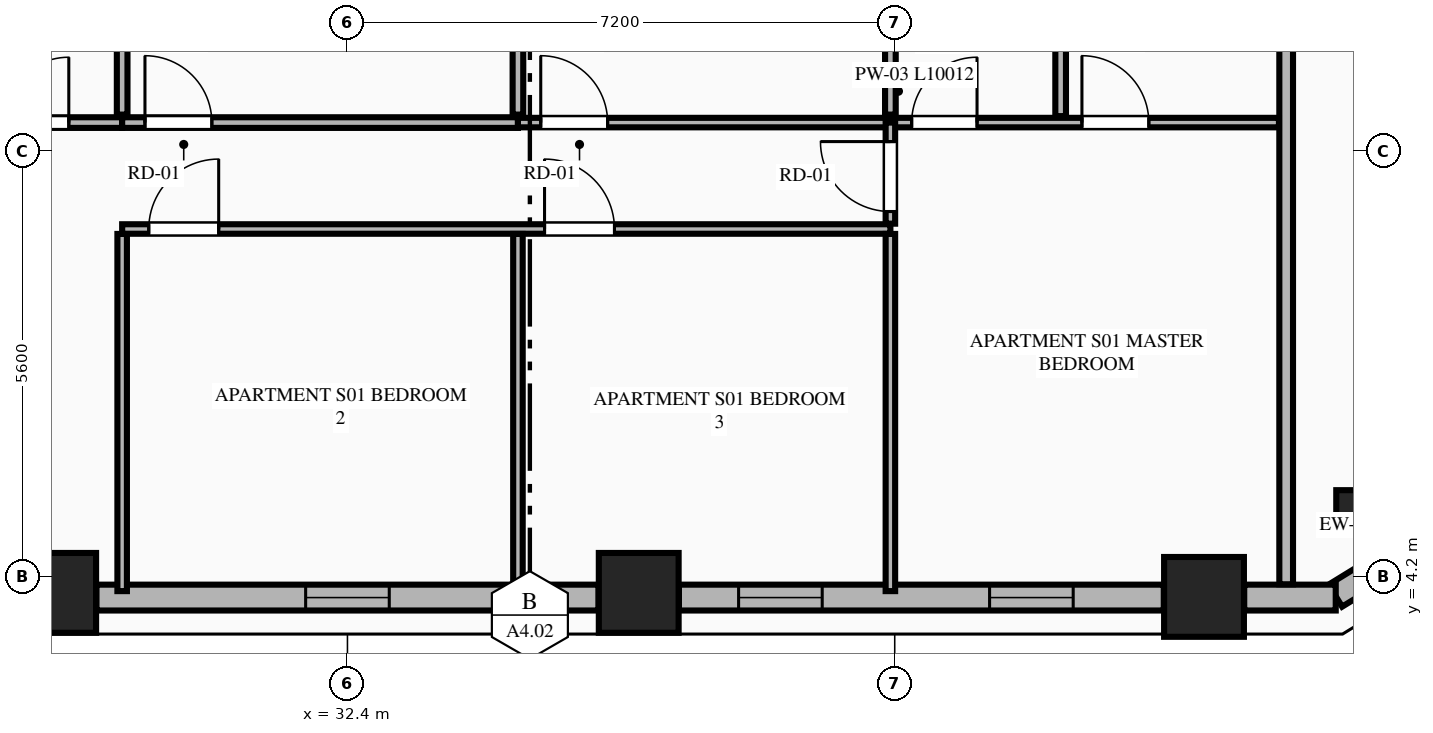
"""IFC4 building model, lengths in metres.
Left out: names, types, materials, properties, quantities, classifications, styles, units other than length and angle.
Written with IfcOpenShell. Run it as: python <this file> out.ifc"""

import sys

from ifc_helpers import new_model, si_unit, direction, frame, frame_2d, origin, origin_2d, place, context, subcontext, project, spatial, rectangle, extrude, element, fill, save


model = new_model("IFC4")
c1 = context("Model", 3, precision=1e-05, world=origin(), true_north=direction((0.0, 1.0)))
c2 = subcontext(c1, "Body", "Model", "MODEL_VIEW")
j1 = project(units=[si_unit("LENGTHUNIT", "METRE"), si_unit("PLANEANGLEUNIT", "RADIAN")], contexts=[c1])
p1 = place(None, origin())
s1 = spatial("IfcSite", under=j1, at=p1, CompositionType="ELEMENT")
p2 = place(p1, origin())
s2 = spatial("IfcBuilding", under=s1, at=p2, CompositionType="ELEMENT")
p3 = place(p2, frame((0.0, 0.0, 123.25)))
s3 = spatial("IfcBuildingStorey", under=s2, at=p3, CompositionType="ELEMENT", Elevation=123.25)
for number, where, z_axis, x_axis in (
    (1, (28.568, 3.992, 0.0), (0.0, 0.0, 1.0), (1.0, 0.0, 0.0)),
    (2, (36.232, 3.992, 0.0), (0.0, 0.0, 1.0), (1.0, 0.0, 0.0)),
    (3, (43.669, 3.939, 0.0), (0.0, 0.0, 1.0), (1.0, 0.0, 0.0)),
):
    element("IfcColumn", number, at=place(p3, frame(where, z_axis=z_axis, x_axis=x_axis)), inside=s3, PredefinedType="COLUMN", context=c2, shape_type="SweptSolid", body=[
        extrude(rectangle(XDim=1.05, YDim=1.05, at=origin_2d()), origin(), (0.0, 0.0, 1.0), 3.55),
    ])
p4 = place(p3, frame((45.659, 5.093, 0.0), z_axis=(0.0, 0.0, 1.0), x_axis=(0.865160173452, 0.501495637342, 0.0)))
e4 = element("IfcColumn", 4, at=p4, inside=s3, PredefinedType="PILASTER", context=c2, shape_type="SweptSolid", body=[
    extrude(rectangle(XDim=0.5, YDim=0.35, at=origin_2d()), origin(), (0.0, 0.0, 1.0), 3.55),
])
p5 = place(p3, frame((45.397, 3.955, 0.0), z_axis=(0.0, 0.0, 1.0), x_axis=(0.851798915137, 0.523868884523, 0.0)))
e5 = element("IfcWall", 5, at=p5, inside=s3, PredefinedType="STANDARD", context=c2, shape_type="SweptSolid", body=[
    extrude(rectangle(XDim=1.848, YDim=0.34, at=frame_2d((0.924, 0.0))), origin(), (0.0, 0.0, 1.0), 3.34),
])
p6 = place(p3, frame((29.097, 3.93, 0.0), z_axis=(0.0, 0.0, 1.0), x_axis=(1.0, 0.0, 0.0)))
e6 = element("IfcWall", 6, at=p6, inside=s3, PredefinedType="STANDARD", context=c2, shape_type="SweptSolid", body=[
    extrude(rectangle(XDim=6.606, YDim=0.34, at=frame_2d((3.303, 0.0))), origin(), (0.0, 0.0, 1.0), 2.797),
])
p7 = place(p6, frame((2.753, 0.0, 0.75)))
e7 = element("IfcOpeningElement", 7, at=p7, cuts=e6, PredefinedType="OPENING", context=c2, shape_type="SweptSolid", body=[
    extrude(rectangle(XDim=1.1, YDim=1.897, at=frame_2d((0.55, 0.948))), frame((0.0, 0.18, 0.0), z_axis=(0.0, -1.0, 0.0), x_axis=(1.0, 0.0, 0.0)), (0.0, 0.0, 1.0), 0.36),
])
p8 = place(p3, frame((36.761, 3.93, 0.0), z_axis=(0.0, 0.0, 1.0), x_axis=(1.0, 0.0, 0.0)))
e8 = element("IfcWall", 8, at=p8, inside=s3, PredefinedType="STANDARD", context=c2, shape_type="SweptSolid", body=[
    extrude(rectangle(XDim=6.379, YDim=0.34, at=frame_2d((3.189, 0.0))), origin(), (0.0, 0.0, 1.0), 2.797),
])
p9 = place(p8, frame((0.785, 0.0, 0.75)))
e9 = element("IfcOpeningElement", 9, at=p9, cuts=e8, PredefinedType="OPENING", context=c2, shape_type="SweptSolid", body=[
    extrude(rectangle(XDim=1.1, YDim=1.897, at=frame_2d((0.55, 0.948))), frame((0.0, 0.18, 0.0), z_axis=(0.0, -1.0, 0.0), x_axis=(1.0, 0.0, 0.0)), (0.0, 0.0, 1.0), 0.36),
])
p10 = place(p8, frame((4.087, 0.0, 0.75)))
e10 = element("IfcOpeningElement", 10, at=p10, cuts=e8, PredefinedType="OPENING", context=c2, shape_type="SweptSolid", body=[
    extrude(rectangle(XDim=1.1, YDim=1.897, at=frame_2d((0.55, 0.948))), frame((0.0, 0.18, 0.0), z_axis=(0.0, -1.0, 0.0), x_axis=(1.0, 0.0, 0.0)), (0.0, 0.0, 1.0), 0.36),
])
p11 = place(p3, frame((44.198, 3.93, 0.0), z_axis=(0.0, 0.0, 1.0), x_axis=(1.0, 0.0, 0.0)))
e11 = element("IfcWall", 11, at=p11, inside=s3, PredefinedType="STANDARD", context=c2, shape_type="SweptSolid", body=[
    extrude(rectangle(XDim=1.204, YDim=0.34, at=frame_2d((0.602, 0.0))), origin(), (0.0, 0.0, 1.0), 3.34),
])
p12 = place(p3, frame((44.75, 4.105, 0.0), z_axis=(0.0, 0.0, 1.0), x_axis=(0.0, 1.0, 0.0)))
e12 = element("IfcWall", 12, at=p12, inside=s3, PredefinedType="PARTITIONING", context=c2, shape_type="SweptSolid", body=[
    extrude(rectangle(XDim=12.395, YDim=0.18, at=frame_2d((6.198, 0.0))), origin(), (0.0, 0.0, 1.0), 3.34),
])
p13 = place(p3, frame((22.1, 10.179, 0.0), z_axis=(0.0, 0.0, 1.0), x_axis=(1.0, 0.0, 0.0)))
e13 = element("IfcWall", 13, at=p13, inside=s3, PredefinedType="PLUMBINGWALL", context=c2, shape_type="SweptSolid", body=[
    extrude(rectangle(XDim=7.336, YDim=0.14, at=frame_2d((3.668, 0.0))), origin(), (0.0, 0.0, 1.0), 3.34),
])
p14 = place(p13, frame((5.774, 0.0, 0.0)))
e14 = element("IfcOpeningElement", 14, at=p14, cuts=e13, PredefinedType="OPENING", context=c2, shape_type="SweptSolid", body=[
    extrude(rectangle(XDim=0.86, YDim=2.1, at=frame_2d((0.43, 1.05))), frame((0.0, 0.08, 0.0), z_axis=(0.0, -1.0, 0.0), x_axis=(1.0, 0.0, 0.0)), (0.0, 0.0, 1.0), 0.16),
])
p15 = place(p13, frame((0.26, 0.0, 0.0)))
e15 = element("IfcOpeningElement", 15, at=p15, cuts=e13, PredefinedType="OPENING", context=c2, shape_type="SweptSolid", body=[
    extrude(rectangle(XDim=0.88, YDim=2.15, at=frame_2d((0.44, 1.075))), frame((0.0, 0.08, 0.0), z_axis=(0.0, -1.0, 0.0), x_axis=(1.0, 0.0, 0.0)), (0.0, 0.0, 1.0), 0.16),
])
p16 = place(p13, frame((3.485, 0.0, 0.0)))
e16 = element("IfcOpeningElement", 16, at=p16, cuts=e13, PredefinedType="OPENING", context=c2, shape_type="SweptSolid", body=[
    extrude(rectangle(XDim=0.88, YDim=2.15, at=frame_2d((0.44, 1.075))), frame((0.0, 0.08, 0.0), z_axis=(0.0, -1.0, 0.0), x_axis=(1.0, 0.0, 0.0)), (0.0, 0.0, 1.0), 0.16),
])
p17 = place(p3, frame((29.436, 10.179, 0.0), z_axis=(0.0, 0.0, 1.0), x_axis=(1.0, 0.0, 0.0)))
e17 = element("IfcWall", 17, at=p17, inside=s3, PredefinedType="PLUMBINGWALL", context=c2, shape_type="SweptSolid", body=[
    extrude(rectangle(XDim=5.207, YDim=0.14, at=frame_2d((2.604, 0.0))), origin(), (0.0, 0.0, 1.0), 3.34),
])
p18 = place(p17, frame((0.3, 0.0, 0.0)))
e18 = element("IfcOpeningElement", 18, at=p18, cuts=e17, PredefinedType="OPENING", context=c2, shape_type="SweptSolid", body=[
    extrude(rectangle(XDim=0.88, YDim=2.15, at=frame_2d((0.44, 1.075))), frame((0.0, 0.08, 0.0), z_axis=(0.0, -1.0, 0.0), x_axis=(1.0, 0.0, 0.0)), (0.0, 0.0, 1.0), 0.16),
])
p19 = place(p3, frame((34.643, 10.179, 0.0), z_axis=(0.0, 0.0, 1.0), x_axis=(1.0, 0.0, 0.0)))
e19 = element("IfcWall", 19, at=p19, inside=s3, PredefinedType="PARTITIONING", context=c2, shape_type="SweptSolid", body=[
    extrude(rectangle(XDim=10.012, YDim=0.125, at=frame_2d((5.006, 0.0))), origin(), (0.0, 0.0, 1.0), 3.34),
])
p20 = place(p19, frame((5.18, 0.0, 0.0)))
e20 = element("IfcOpeningElement", 20, at=p20, cuts=e19, PredefinedType="OPENING", context=c2, shape_type="SweptSolid", body=[
    extrude(rectangle(XDim=0.86, YDim=2.1, at=frame_2d((0.43, 1.05))), frame((0.0, 0.073, 0.0), z_axis=(0.0, -1.0, 0.0), x_axis=(1.0, 0.0, 0.0)), (0.0, 0.0, 1.0), 0.145),
])
p21 = place(p19, frame((7.42, 0.0, 0.0)))
e21 = element("IfcOpeningElement", 21, at=p21, cuts=e19, PredefinedType="OPENING", context=c2, shape_type="SweptSolid", body=[
    extrude(rectangle(XDim=0.88, YDim=2.15, at=frame_2d((0.44, 1.075))), frame((0.0, 0.073, 0.0), z_axis=(0.0, -1.0, 0.0), x_axis=(1.0, 0.0, 0.0)), (0.0, 0.0, 1.0), 0.145),
])
p22 = place(p19, frame((0.3, 0.0, 0.0)))
e22 = element("IfcOpeningElement", 22, at=p22, cuts=e19, PredefinedType="OPENING", context=c2, shape_type="SweptSolid", body=[
    extrude(rectangle(XDim=0.88, YDim=2.15, at=frame_2d((0.44, 1.075))), frame((0.0, 0.073, 0.0), z_axis=(0.0, -1.0, 0.0), x_axis=(1.0, 0.0, 0.0)), (0.0, 0.0, 1.0), 0.145),
])
p23 = place(p3, frame((29.436, 4.015, 0.0), z_axis=(0.0, 0.0, 1.0), x_axis=(0.0, 1.0, 0.0)))
e23 = element("IfcWall", 23, at=p23, inside=s3, PredefinedType="PARTITIONING", context=c2, shape_type="SweptSolid", body=[
    extrude(rectangle(XDim=4.699, YDim=0.125, at=frame_2d((2.35, 0.0))), origin(), (0.0, 0.0, 1.0), 3.34),
])
p24 = place(p3, frame((29.436, 8.779, 0.0), z_axis=(0.0, 0.0, 1.0), x_axis=(1.0, 0.0, 0.0)))
e24 = element("IfcWall", 24, at=p24, inside=s3, PredefinedType="PARTITIONING", context=c2, shape_type="SweptSolid", body=[
    extrude(rectangle(XDim=10.107, YDim=0.125, at=frame_2d((5.053, 0.0))), origin(), (0.0, 0.0, 1.0), 3.34),
])
p25 = place(p24, frame((0.35, 0.0, 0.0)))
e25 = element("IfcOpeningElement", 25, at=p25, cuts=e24, PredefinedType="OPENING", context=c2, shape_type="SweptSolid", body=[
    extrude(rectangle(XDim=0.92, YDim=2.15, at=frame_2d((0.46, 1.075))), frame((0.0, 0.073, 0.0), z_axis=(0.0, -1.0, 0.0), x_axis=(1.0, 0.0, 0.0)), (0.0, 0.0, 1.0), 0.145),
])
p26 = place(p24, frame((5.557, 0.0, 0.0)))
e26 = element("IfcOpeningElement", 26, at=p26, cuts=e24, PredefinedType="OPENING", context=c2, shape_type="SweptSolid", body=[
    extrude(rectangle(XDim=0.92, YDim=2.15, at=frame_2d((0.46, 1.075))), frame((0.0, 0.073, 0.0), z_axis=(0.0, -1.0, 0.0), x_axis=(1.0, 0.0, 0.0)), (0.0, 0.0, 1.0), 0.145),
])
p27 = place(p3, frame((39.543, 8.849, 0.0), z_axis=(0.0, 0.0, 1.0), x_axis=(0.0, 1.0, 0.0)))
e27 = element("IfcWall", 27, at=p27, inside=s3, PredefinedType="PARTITIONING", context=c2, shape_type="SweptSolid", body=[
    extrude(rectangle(XDim=1.33, YDim=0.125, at=frame_2d((0.665, 0.0))), origin(), (0.0, 0.0, 1.0), 3.34),
])
p28 = place(p27, frame((0.16, 0.0, 0.0)))
e28 = element("IfcOpeningElement", 28, at=p28, cuts=e27, PredefinedType="OPENING", context=c2, shape_type="SweptSolid", body=[
    extrude(rectangle(XDim=0.92, YDim=2.15, at=frame_2d((0.46, 1.075))), frame((0.0, 0.073, 0.0), z_axis=(0.0, -1.0, 0.0), x_axis=(1.0, 0.0, 0.0)), (0.0, 0.0, 1.0), 0.145),
])
for number, where, z_axis, x_axis in (
    (29, (29.436, 10.284, 0.0), (0.0, 0.0, 1.0), (0.0, 1.0, 0.0)),
    (30, (34.643, 10.284, 0.0), (0.0, 0.0, 1.0), (0.0, 1.0, 0.0)),
):
    element("IfcWall", number, at=place(p3, frame(where, z_axis=z_axis, x_axis=x_axis)), inside=s3, PredefinedType="PLUMBINGWALL", context=c2, shape_type="SweptSolid", body=[
        extrude(rectangle(XDim=6.131, YDim=0.14, at=frame_2d((3.065, 0.0))), origin(), (0.0, 0.0, 1.0), 3.34),
    ])
for number, where, z_axis, x_axis in (
    (31, (34.643, 4.015, 0.0), (0.0, 0.0, 1.0), (0.0, 1.0, 0.0)),
    (32, (39.543, 4.015, 0.0), (0.0, 0.0, 1.0), (0.0, 1.0, 0.0)),
):
    element("IfcWall", number, at=place(p3, frame(where, z_axis=z_axis, x_axis=x_axis)), inside=s3, PredefinedType="PARTITIONING", context=c2, shape_type="SweptSolid", body=[
        extrude(rectangle(XDim=4.699, YDim=0.125, at=frame_2d((2.35, 0.0))), origin(), (0.0, 0.0, 1.0), 3.34),
    ])
p29 = place(p3, frame((39.543, 10.284, 0.0), z_axis=(0.0, 0.0, 1.0), x_axis=(0.0, 1.0, 0.0)))
e33 = element("IfcWall", 33, at=p29, inside=s3, PredefinedType="PLUMBINGWALL", context=c2, shape_type="SweptSolid", body=[
    extrude(rectangle(XDim=6.131, YDim=0.14, at=frame_2d((3.065, 0.0))), origin(), (0.0, 0.0, 1.0), 3.34),
])
p30 = place(p3, frame((41.783, 10.264, 0.0), z_axis=(0.0, 0.0, 1.0), x_axis=(0.0, 1.0, 0.0)))
e34 = element("IfcWall", 34, at=p30, inside=s3, PredefinedType="PLUMBINGWALL", context=c2, shape_type="SweptSolid", body=[
    extrude(rectangle(XDim=6.151, YDim=0.14, at=frame_2d((3.076, 0.0))), origin(), (0.0, 0.0, 1.0), 2.722),
])
p31 = place(p7, origin())
e35 = element("IfcWindow", 35, at=p31, inside=s3, PartitioningType="SINGLE_PANEL", PredefinedType="WINDOW", context=c2, shape_type="SweptSolid", body=[
    extrude(rectangle(XDim=1.1, YDim=1.897, at=frame_2d((0.55, 0.948))), frame((0.0, 0.03, 0.0), z_axis=(0.0, -1.0, 0.0), x_axis=(1.0, 0.0, 0.0)), (0.0, 0.0, 1.0), 0.06),
])
fill(e7, e35)
p32 = place(p9, origin())
e36 = element("IfcWindow", 36, at=p32, inside=s3, PartitioningType="SINGLE_PANEL", PredefinedType="WINDOW", context=c2, shape_type="SweptSolid", body=[
    extrude(rectangle(XDim=1.1, YDim=1.897, at=frame_2d((0.55, 0.948))), frame((0.0, 0.03, 0.0), z_axis=(0.0, -1.0, 0.0), x_axis=(1.0, 0.0, 0.0)), (0.0, 0.0, 1.0), 0.06),
])
fill(e9, e36)
p33 = place(p14, origin())
e37 = element("IfcDoor", 37, at=p33, inside=s3, OperationType="SINGLE_SWING_RIGHT", PredefinedType="DOOR", context=c2, shape_type="SweptSolid", body=[
    extrude(rectangle(XDim=0.86, YDim=2.1, at=frame_2d((0.43, 1.05))), frame((0.0, 0.025, 0.0), z_axis=(0.0, -1.0, 0.0), x_axis=(1.0, 0.0, 0.0)), (0.0, 0.0, 1.0), 0.05),
])
fill(e14, e37)
p34 = place(p20, origin())
e38 = element("IfcDoor", 38, at=p34, inside=s3, OperationType="SINGLE_SWING_RIGHT", PredefinedType="DOOR", context=c2, shape_type="SweptSolid", body=[
    extrude(rectangle(XDim=0.86, YDim=2.1, at=frame_2d((0.43, 1.05))), frame((0.0, 0.025, 0.0), z_axis=(0.0, -1.0, 0.0), x_axis=(1.0, 0.0, 0.0)), (0.0, 0.0, 1.0), 0.05),
])
fill(e20, e38)
p35 = place(p21, origin())
e39 = element("IfcDoor", 39, at=p35, inside=s3, OperationType="SINGLE_SWING_LEFT", PredefinedType="DOOR", context=c2, shape_type="SweptSolid", body=[
    extrude(rectangle(XDim=0.88, YDim=2.15, at=frame_2d((0.44, 1.075))), frame((0.0, 0.025, 0.0), z_axis=(0.0, -1.0, 0.0), x_axis=(1.0, 0.0, 0.0)), (0.0, 0.0, 1.0), 0.05),
])
fill(e21, e39)
p36 = place(p18, origin())
e40 = element("IfcDoor", 40, at=p36, inside=s3, OperationType="SINGLE_SWING_LEFT", PredefinedType="DOOR", context=c2, shape_type="SweptSolid", body=[
    extrude(rectangle(XDim=0.88, YDim=2.15, at=frame_2d((0.44, 1.075))), frame((0.0, 0.025, 0.0), z_axis=(0.0, -1.0, 0.0), x_axis=(1.0, 0.0, 0.0)), (0.0, 0.0, 1.0), 0.05),
])
fill(e18, e40)
p37 = place(p25, origin())
e41 = element("IfcDoor", 41, at=p37, inside=s3, OperationType="SINGLE_SWING_RIGHT", PredefinedType="DOOR", context=c2, shape_type="SweptSolid", body=[
    extrude(rectangle(XDim=0.92, YDim=2.15, at=frame_2d((0.46, 1.075))), frame((0.0, 0.025, 0.0), z_axis=(0.0, -1.0, 0.0), x_axis=(1.0, 0.0, 0.0)), (0.0, 0.0, 1.0), 0.05),
])
fill(e25, e41)
p38 = place(p26, origin())
e42 = element("IfcDoor", 42, at=p38, inside=s3, OperationType="SINGLE_SWING_LEFT", PredefinedType="DOOR", context=c2, shape_type="SweptSolid", body=[
    extrude(rectangle(XDim=0.92, YDim=2.15, at=frame_2d((0.46, 1.075))), frame((0.0, 0.025, 0.0), z_axis=(0.0, -1.0, 0.0), x_axis=(1.0, 0.0, 0.0)), (0.0, 0.0, 1.0), 0.05),
])
fill(e26, e42)
p39 = place(p28, origin())
e43 = element("IfcDoor", 43, at=p39, inside=s3, OperationType="SINGLE_SWING_RIGHT", PredefinedType="DOOR", context=c2, shape_type="SweptSolid", body=[
    extrude(rectangle(XDim=0.92, YDim=2.15, at=frame_2d((0.46, 1.075))), frame((0.0, 0.025, 0.0), z_axis=(0.0, -1.0, 0.0), x_axis=(1.0, 0.0, 0.0)), (0.0, 0.0, 1.0), 0.05),
])
fill(e28, e43)
p40 = place(p22, origin())
e44 = element("IfcDoor", 44, at=p40, inside=s3, OperationType="SINGLE_SWING_LEFT", PredefinedType="DOOR", context=c2, shape_type="SweptSolid", body=[
    extrude(rectangle(XDim=0.88, YDim=2.15, at=frame_2d((0.44, 1.075))), frame((0.0, 0.025, 0.0), z_axis=(0.0, -1.0, 0.0), x_axis=(1.0, 0.0, 0.0)), (0.0, 0.0, 1.0), 0.05),
])
fill(e22, e44)
p41 = place(p10, origin())
e45 = element("IfcWindow", 45, at=p41, inside=s3, PartitioningType="SINGLE_PANEL", PredefinedType="WINDOW", context=c2, shape_type="SweptSolid", body=[
    extrude(rectangle(XDim=1.1, YDim=1.897, at=frame_2d((0.55, 0.948))), frame((0.0, 0.03, 0.0), z_axis=(0.0, -1.0, 0.0), x_axis=(1.0, 0.0, 0.0)), (0.0, 0.0, 1.0), 0.06),
])
fill(e10, e45)
save(model, sys.argv[1])
